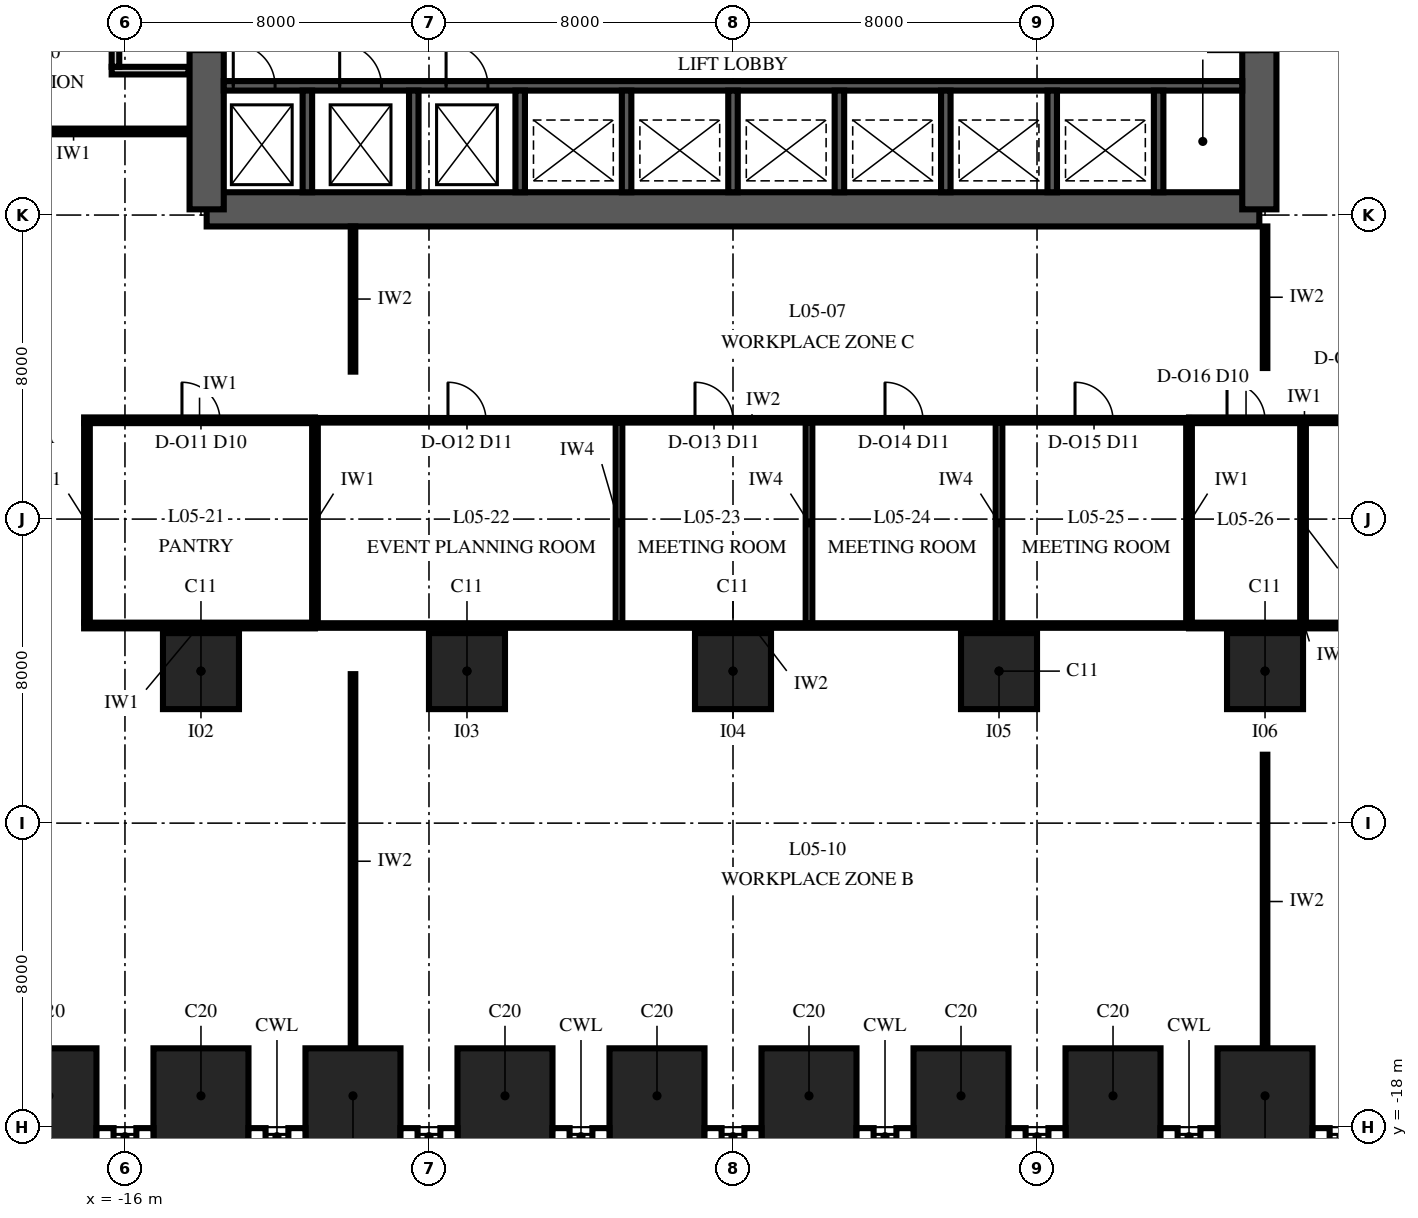
"""IFC4 building model, lengths in metres.
Left out: names, types, materials, properties, quantities, classifications, styles, units other than length and angle.
Written with IfcOpenShell. Run it as: python <this file> out.ifc"""

import sys

from ifc_helpers import new_model, si_unit, direction, frame, frame_2d, origin, origin_2d, place, context, subcontext, project, spatial, polyline, rectangle, outline, extrude, element, fill, save


model = new_model("IFC4")
c1 = context("Model", 3, precision=1e-05, world=origin(), true_north=direction((0.0, 1.0)))
c2 = subcontext(c1, "Body", "Model", "MODEL_VIEW")
j1 = project(units=[si_unit("LENGTHUNIT", "METRE"), si_unit("PLANEANGLEUNIT", "RADIAN")], contexts=[c1])
p1 = place(None, origin())
s1 = spatial("IfcSite", under=j1, at=p1, CompositionType="ELEMENT")
p2 = place(p1, origin())
s2 = spatial("IfcBuilding", under=s1, at=p2, CompositionType="ELEMENT")
p3 = place(p2, frame((0.0, 0.0, 32.0)))
s3 = spatial("IfcBuildingStorey", under=s2, at=p3, CompositionType="ELEMENT", Elevation=32.0)
for number, where, z_axis, x_axis in (
    (1, (-18.0, -17.175, 0.0), (0.0, 0.0, 1.0), (1.0, 0.0, 0.0)),
    (2, (-14.0, -17.175, 0.0), (0.0, 0.0, 1.0), (1.0, 0.0, 0.0)),
    (3, (-10.0, -17.175, 0.0), (0.0, 0.0, 1.0), (1.0, 0.0, 0.0)),
    (4, (-6.0, -17.175, 0.0), (0.0, 0.0, 1.0), (1.0, 0.0, 0.0)),
    (5, (-2.0, -17.175, 0.0), (0.0, 0.0, 1.0), (1.0, 0.0, 0.0)),
    (6, (2.0, -17.175, 0.0), (0.0, 0.0, 1.0), (1.0, 0.0, 0.0)),
    (7, (6.0, -17.175, 0.0), (0.0, 0.0, 1.0), (1.0, 0.0, 0.0)),
    (8, (10.0, -17.175, 0.0), (0.0, 0.0, 1.0), (1.0, 0.0, 0.0)),
    (9, (14.0, -17.175, 0.0), (0.0, 0.0, 1.0), (1.0, 0.0, 0.0)),
):
    element("IfcColumn", number, at=place(p3, frame(where, z_axis=z_axis, x_axis=x_axis)), inside=s3, PredefinedType="COLUMN", context=c2, shape_type="SweptSolid", body=[
        extrude(rectangle(XDim=2.5, YDim=2.5, at=origin_2d()), origin(), (0.0, 0.0, 1.0), 4.0),
    ])
for number, where, z_axis, x_axis in (
    (10, (-14.0, -6.0, 0.0), (0.0, 0.0, 1.0), (1.0, 0.0, 0.0)),
    (11, (-7.0, -6.0, 0.0), (0.0, 0.0, 1.0), (1.0, 0.0, 0.0)),
    (12, (0.0, -6.0, 0.0), (0.0, 0.0, 1.0), (1.0, 0.0, 0.0)),
    (13, (7.0, -6.0, 0.0), (0.0, 0.0, 1.0), (1.0, 0.0, 0.0)),
    (14, (14.0, -6.0, 0.0), (0.0, 0.0, 1.0), (1.0, 0.0, 0.0)),
):
    element("IfcColumn", number, at=place(p3, frame(where, z_axis=z_axis, x_axis=x_axis)), inside=s3, PredefinedType="COLUMN", context=c2, shape_type="SweptSolid", body=[
        extrude(rectangle(XDim=2.0, YDim=2.0, at=origin_2d()), origin(), (0.0, 0.0, 1.0), 4.0),
    ])
p4 = place(p3, frame((-13.85, 6.15, 0.0), z_axis=(0.0, 0.0, 1.0), x_axis=(1.0, 0.0, 0.0)))
e15 = element("IfcWall", 15, at=p4, inside=s3, PredefinedType="SHEAR", context=c2, shape_type="SweptSolid", body=[
    extrude(rectangle(XDim=27.7, YDim=0.9, at=frame_2d((13.85, 0.0))), origin(), (0.0, 0.0, 1.0), 4.0),
])
p5 = place(p3, frame((13.85, 6.15, 0.0), z_axis=(0.0, 0.0, 1.0), x_axis=(0.0, 1.0, 0.0)))
e16 = element("IfcWall", 16, at=p5, inside=s3, PredefinedType="SHEAR", context=c2, shape_type="SweptSolid", body=[
    extrude(outline(polyline([(0.0, -0.45), (17.7, -0.45), (17.7, 0.0), (17.25, 0.0), (17.25, 0.45), (0.45, 0.45), (0.45, 0.0), (0.0, 0.0), (0.0, -0.45)])), origin(), (0.0, 0.0, 1.0), 4.0),
])
p6 = place(p5, frame((4.15, 0.0, 0.0)))
e17 = element("IfcOpeningElement", 17, at=p6, cuts=e16, PredefinedType="OPENING", context=c2, shape_type="SweptSolid", body=[
    extrude(rectangle(XDim=1.8, YDim=2.4, at=frame_2d((0.9, 1.2))), frame((0.0, 0.465, 0.0), z_axis=(0.0, -1.0, 0.0), x_axis=(1.0, 0.0, 0.0)), (0.0, 0.0, 1.0), 0.93),
])
p7 = place(p3, frame((-13.85, 23.85, 0.0), z_axis=(0.0, 0.0, 1.0), x_axis=(0.0, -1.0, 0.0)))
e18 = element("IfcWall", 18, at=p7, inside=s3, PredefinedType="SHEAR", context=c2, shape_type="SweptSolid", body=[
    extrude(outline(polyline([(0.0, -0.45), (17.7, -0.45), (17.7, 0.0), (17.25, 0.0), (17.25, 0.45), (0.45, 0.45), (0.45, 0.0), (0.0, 0.0), (0.0, -0.45)])), origin(), (0.0, 0.0, 1.0), 4.0),
])
p8 = place(p7, frame((11.75, 0.0, 0.0)))
e19 = element("IfcOpeningElement", 19, at=p8, cuts=e18, PredefinedType="OPENING", context=c2, shape_type="SweptSolid", body=[
    extrude(rectangle(XDim=1.8, YDim=2.4, at=frame_2d((0.9, 1.2))), frame((0.0, 0.465, 0.0), z_axis=(0.0, -1.0, 0.0), x_axis=(1.0, 0.0, 0.0)), (0.0, 0.0, 1.0), 0.93),
])
p9 = place(p3, frame((-13.4, 9.4, 0.0), z_axis=(0.0, 0.0, 1.0), x_axis=(1.0, 0.0, 0.0)))
e20 = element("IfcWall", 20, at=p9, inside=s3, PredefinedType="SHEAR", context=c2, shape_type="SweptSolid", body=[
    extrude(rectangle(XDim=26.8, YDim=0.25, at=frame_2d((13.4, 0.0))), origin(), (0.0, 0.0, 1.0), 4.0),
])
p10 = place(p9, frame((0.25, 0.0, 0.0)))
e21 = element("IfcOpeningElement", 21, at=p10, cuts=e20, PredefinedType="OPENING", context=c2, shape_type="SweptSolid", body=[
    extrude(rectangle(XDim=1.1, YDim=2.1, at=frame_2d((0.55, 1.05))), frame((0.0, 0.14, 0.0), z_axis=(0.0, -1.0, 0.0), x_axis=(1.0, 0.0, 0.0)), (0.0, 0.0, 1.0), 0.28),
])
p11 = place(p9, frame((3.05, 0.0, 0.0)))
e22 = element("IfcOpeningElement", 22, at=p11, cuts=e20, PredefinedType="OPENING", context=c2, shape_type="SweptSolid", body=[
    extrude(rectangle(XDim=1.1, YDim=2.1, at=frame_2d((0.55, 1.05))), frame((0.0, 0.14, 0.0), z_axis=(0.0, -1.0, 0.0), x_axis=(1.0, 0.0, 0.0)), (0.0, 0.0, 1.0), 0.28),
])
p12 = place(p9, frame((5.85, 0.0, 0.0)))
e23 = element("IfcOpeningElement", 23, at=p12, cuts=e20, PredefinedType="OPENING", context=c2, shape_type="SweptSolid", body=[
    extrude(rectangle(XDim=1.1, YDim=2.1, at=frame_2d((0.55, 1.05))), frame((0.0, 0.14, 0.0), z_axis=(0.0, -1.0, 0.0), x_axis=(1.0, 0.0, 0.0)), (0.0, 0.0, 1.0), 0.28),
])
for number, where, z_axis, x_axis in (
    (24, (-11.2, 6.6, 0.0), (0.0, 0.0, 1.0), (0.0, 1.0, 0.0)),
    (25, (-8.4, 6.6, 0.0), (0.0, 0.0, 1.0), (0.0, 1.0, 0.0)),
    (26, (-5.6, 6.6, 0.0), (0.0, 0.0, 1.0), (0.0, 1.0, 0.0)),
    (27, (-2.8, 6.6, 0.0), (0.0, 0.0, 1.0), (0.0, 1.0, 0.0)),
    (28, (0.0, 6.6, 0.0), (0.0, 0.0, 1.0), (0.0, 1.0, 0.0)),
    (29, (2.8, 6.6, 0.0), (0.0, 0.0, 1.0), (0.0, 1.0, 0.0)),
    (30, (5.6, 6.6, 0.0), (0.0, 0.0, 1.0), (0.0, 1.0, 0.0)),
    (31, (8.4, 6.6, 0.0), (0.0, 0.0, 1.0), (0.0, 1.0, 0.0)),
    (32, (11.2, 6.6, 0.0), (0.0, 0.0, 1.0), (0.0, 1.0, 0.0)),
):
    element("IfcWall", number, at=place(p3, frame(where, z_axis=z_axis, x_axis=x_axis)), inside=s3, PredefinedType="SHEAR", context=c2, shape_type="SweptSolid", body=[
        extrude(rectangle(XDim=2.675, YDim=0.25, at=frame_2d((1.337, 0.0))), origin(), (0.0, 0.0, 1.0), 4.0),
    ])
p13 = place(p3, frame((-17.075, -4.8, 0.0), z_axis=(0.0, 0.0, 1.0), x_axis=(1.0, 0.0, 0.0)))
e33 = element("IfcWall", 33, at=p13, inside=s3, PredefinedType="PARTITIONING", context=c2, shape_type="SweptSolid", body=[
    extrude(rectangle(XDim=6.075, YDim=0.15, at=frame_2d((3.038, 0.0))), origin(), (0.0, 0.0, 1.0), 3.25),
])
p14 = place(p3, frame((-11.0, -4.8, 0.0), z_axis=(0.0, 0.0, 1.0), x_axis=(1.0, 0.0, 0.0)))
e34 = element("IfcWall", 34, at=p14, inside=s3, PredefinedType="PARTITIONING", context=c2, shape_type="SweptSolid", body=[
    extrude(rectangle(XDim=23.0, YDim=0.12, at=frame_2d((11.5, 0.0))), origin(), (0.0, 0.0, 1.0), 3.25),
])
p15 = place(p3, frame((12.0, -4.8, 0.0), z_axis=(0.0, 0.0, 1.0), x_axis=(1.0, 0.0, 0.0)))
e35 = element("IfcWall", 35, at=p15, inside=s3, PredefinedType="PARTITIONING", context=c2, shape_type="SweptSolid", body=[
    extrude(rectangle(XDim=6.075, YDim=0.15, at=frame_2d((3.038, 0.0))), origin(), (0.0, 0.0, 1.0), 3.25),
])
p16 = place(p3, frame((-17.075, 0.6, 0.0), z_axis=(0.0, 0.0, 1.0), x_axis=(1.0, 0.0, 0.0)))
e36 = element("IfcWall", 36, at=p16, inside=s3, PredefinedType="PARTITIONING", context=c2, shape_type="SweptSolid", body=[
    extrude(rectangle(XDim=6.075, YDim=0.15, at=frame_2d((3.038, 0.0))), origin(), (0.0, 0.0, 1.0), 3.25),
])
p17 = place(p16, frame((2.575, 0.0, 0.0)))
e37 = element("IfcOpeningElement", 37, at=p17, cuts=e36, PredefinedType="OPENING", context=c2, shape_type="SweptSolid", body=[
    extrude(rectangle(XDim=1.0, YDim=2.3, at=frame_2d((0.5, 1.15))), frame((0.0, 0.09, 0.0), z_axis=(0.0, -1.0, 0.0), x_axis=(1.0, 0.0, 0.0)), (0.0, 0.0, 1.0), 0.18),
])
p18 = place(p3, frame((-11.0, 0.6, 0.0), z_axis=(0.0, 0.0, 1.0), x_axis=(1.0, 0.0, 0.0)))
e38 = element("IfcWall", 38, at=p18, inside=s3, PredefinedType="PARTITIONING", context=c2, shape_type="SweptSolid", body=[
    extrude(rectangle(XDim=23.0, YDim=0.12, at=frame_2d((11.5, 0.0))), origin(), (0.0, 0.0, 1.0), 3.25),
])
p19 = place(p18, frame((3.5, 0.0, 0.0)))
e39 = element("IfcOpeningElement", 39, at=p19, cuts=e38, PredefinedType="OPENING", context=c2, shape_type="SweptSolid", body=[
    extrude(rectangle(XDim=1.0, YDim=2.4, at=frame_2d((0.5, 1.2))), frame((0.0, 0.075, 0.0), z_axis=(0.0, -1.0, 0.0), x_axis=(1.0, 0.0, 0.0)), (0.0, 0.0, 1.0), 0.15),
])
p20 = place(p18, frame((10.0, 0.0, 0.0)))
e40 = element("IfcOpeningElement", 40, at=p20, cuts=e38, PredefinedType="OPENING", context=c2, shape_type="SweptSolid", body=[
    extrude(rectangle(XDim=1.0, YDim=2.4, at=frame_2d((0.5, 1.2))), frame((0.0, 0.075, 0.0), z_axis=(0.0, -1.0, 0.0), x_axis=(1.0, 0.0, 0.0)), (0.0, 0.0, 1.0), 0.15),
])
p21 = place(p18, frame((15.0, 0.0, 0.0)))
e41 = element("IfcOpeningElement", 41, at=p21, cuts=e38, PredefinedType="OPENING", context=c2, shape_type="SweptSolid", body=[
    extrude(rectangle(XDim=1.0, YDim=2.4, at=frame_2d((0.5, 1.2))), frame((0.0, 0.075, 0.0), z_axis=(0.0, -1.0, 0.0), x_axis=(1.0, 0.0, 0.0)), (0.0, 0.0, 1.0), 0.15),
])
p22 = place(p18, frame((20.0, 0.0, 0.0)))
e42 = element("IfcOpeningElement", 42, at=p22, cuts=e38, PredefinedType="OPENING", context=c2, shape_type="SweptSolid", body=[
    extrude(rectangle(XDim=1.0, YDim=2.4, at=frame_2d((0.5, 1.2))), frame((0.0, 0.075, 0.0), z_axis=(0.0, -1.0, 0.0), x_axis=(1.0, 0.0, 0.0)), (0.0, 0.0, 1.0), 0.15),
])
p23 = place(p3, frame((12.0, 0.6, 0.0), z_axis=(0.0, 0.0, 1.0), x_axis=(1.0, 0.0, 0.0)))
e43 = element("IfcWall", 43, at=p23, inside=s3, PredefinedType="PARTITIONING", context=c2, shape_type="SweptSolid", body=[
    extrude(rectangle(XDim=6.075, YDim=0.15, at=frame_2d((3.038, 0.0))), origin(), (0.0, 0.0, 1.0), 3.25),
])
p24 = place(p23, frame((1.0, 0.0, 0.0)))
e44 = element("IfcOpeningElement", 44, at=p24, cuts=e43, PredefinedType="OPENING", context=c2, shape_type="SweptSolid", body=[
    extrude(rectangle(XDim=1.0, YDim=2.3, at=frame_2d((0.5, 1.15))), frame((0.0, 0.09, 0.0), z_axis=(0.0, -1.0, 0.0), x_axis=(1.0, 0.0, 0.0)), (0.0, 0.0, 1.0), 0.18),
])
p25 = place(p23, frame((4.0, 0.0, 0.0)))
e45 = element("IfcOpeningElement", 45, at=p25, cuts=e43, PredefinedType="OPENING", context=c2, shape_type="SweptSolid", body=[
    extrude(rectangle(XDim=1.0, YDim=2.3, at=frame_2d((0.5, 1.15))), frame((0.0, 0.09, 0.0), z_axis=(0.0, -1.0, 0.0), x_axis=(1.0, 0.0, 0.0)), (0.0, 0.0, 1.0), 0.18),
])
p26 = place(p3, frame((-20.375, 8.2, 0.0), z_axis=(0.0, 0.0, 1.0), x_axis=(1.0, 0.0, 0.0)))
e46 = element("IfcWall", 46, at=p26, inside=s3, PredefinedType="PARTITIONING", context=c2, shape_type="SweptSolid", body=[
    extrude(rectangle(XDim=6.045, YDim=0.15, at=frame_2d((3.022, 0.0))), origin(), (0.0, 0.0, 1.0), 3.85),
])
p27 = place(p3, frame((-16.35, 9.8, 0.0), z_axis=(0.0, 0.0, 1.0), x_axis=(1.0, 0.0, 0.0)))
e47 = element("IfcWall", 47, at=p27, inside=s3, PredefinedType="PARTITIONING", context=c2, shape_type="SweptSolid", body=[
    extrude(rectangle(XDim=2.02, YDim=0.2, at=frame_2d((1.01, 0.0))), origin(), (0.0, 0.0, 1.0), 3.85),
])
p28 = place(p3, frame((-17.0, -4.725, 0.0), z_axis=(0.0, 0.0, 1.0), x_axis=(0.0, 1.0, 0.0)))
e48 = element("IfcWall", 48, at=p28, inside=s3, PredefinedType="PARTITIONING", context=c2, shape_type="SweptSolid", body=[
    extrude(rectangle(XDim=5.25, YDim=0.15, at=frame_2d((2.625, 0.0))), origin(), (0.0, 0.0, 1.0), 3.85),
])
p29 = place(p3, frame((-16.25, 9.9, 0.0), z_axis=(0.0, 0.0, 1.0), x_axis=(0.0, 1.0, 0.0)))
e49 = element("IfcWall", 49, at=p29, inside=s3, PredefinedType="PARTITIONING", context=c2, shape_type="SweptSolid", body=[
    extrude(rectangle(XDim=16.25, YDim=0.2, at=frame_2d((8.125, 0.0))), origin(), (0.0, 0.0, 1.0), 3.25),
])
p30 = place(p29, frame((14.75, 0.0, 0.0)))
e50 = element("IfcOpeningElement", 50, at=p30, cuts=e49, PredefinedType="OPENING", context=c2, shape_type="SweptSolid", body=[
    extrude(rectangle(XDim=1.2, YDim=2.4, at=frame_2d((0.6, 1.2))), frame((0.0, 0.115, 0.0), z_axis=(0.0, -1.0, 0.0), x_axis=(1.0, 0.0, 0.0)), (0.0, 0.0, 1.0), 0.23),
])
p31 = place(p3, frame((-11.0, -4.725, 0.0), z_axis=(0.0, 0.0, 1.0), x_axis=(0.0, 1.0, 0.0)))
e51 = element("IfcWall", 51, at=p31, inside=s3, PredefinedType="PARTITIONING", context=c2, shape_type="SweptSolid", body=[
    extrude(rectangle(XDim=5.25, YDim=0.15, at=frame_2d((2.625, 0.0))), origin(), (0.0, 0.0, 1.0), 3.85),
])
p32 = place(p3, frame((-3.0, -4.74, 0.0), z_axis=(0.0, 0.0, 1.0), x_axis=(0.0, 1.0, 0.0)))
e52 = element("IfcWall", 52, at=p32, inside=s3, PredefinedType="PARTITIONING", context=c2, shape_type="SweptSolid", body=[
    extrude(rectangle(XDim=5.28, YDim=0.175, at=frame_2d((2.64, 0.0))), origin(), (0.0, 0.0, 1.0), 3.85),
])
p33 = place(p3, frame((2.0, -4.74, 0.0), z_axis=(0.0, 0.0, 1.0), x_axis=(0.0, 1.0, 0.0)))
e53 = element("IfcWall", 53, at=p33, inside=s3, PredefinedType="PARTITIONING", context=c2, shape_type="SweptSolid", body=[
    extrude(rectangle(XDim=5.28, YDim=0.175, at=frame_2d((2.64, 0.0))), origin(), (0.0, 0.0, 1.0), 3.25),
])
p34 = place(p3, frame((7.0, -4.74, 0.0), z_axis=(0.0, 0.0, 1.0), x_axis=(0.0, 1.0, 0.0)))
e54 = element("IfcWall", 54, at=p34, inside=s3, PredefinedType="PARTITIONING", context=c2, shape_type="SweptSolid", body=[
    extrude(rectangle(XDim=5.28, YDim=0.175, at=frame_2d((2.64, 0.0))), origin(), (0.0, 0.0, 1.0), 3.85),
])
for number, where, z_axis, x_axis in (
    (55, (12.0, -4.725, 0.0), (0.0, 0.0, 1.0), (0.0, 1.0, 0.0)),
    (56, (15.0, -4.725, 0.0), (0.0, 0.0, 1.0), (0.0, 1.0, 0.0)),
):
    element("IfcWall", number, at=place(p3, frame(where, z_axis=z_axis, x_axis=x_axis)), inside=s3, PredefinedType="PARTITIONING", context=c2, shape_type="SweptSolid", body=[
        extrude(rectangle(XDim=5.25, YDim=0.15, at=frame_2d((2.625, 0.0))), origin(), (0.0, 0.0, 1.0), 3.85),
    ])
p35 = place(p3, frame((-9.999, -15.925, 0.0), z_axis=(0.0, 0.0, 1.0), x_axis=(0.0, 1.0, 0.0)))
e57 = element("IfcWall", 57, at=p35, inside=s3, PredefinedType="PARTITIONING", context=c2, shape_type="SweptSolid", body=[
    extrude(rectangle(XDim=9.845, YDim=0.12, at=frame_2d((4.922, 0.0))), origin(), (0.0, 0.0, 1.0), 2.842),
])
p36 = place(p3, frame((-9.999, 1.88, 0.0), z_axis=(0.0, 0.0, 1.0), x_axis=(0.0, 1.0, 0.0)))
e58 = element("IfcWall", 58, at=p36, inside=s3, PredefinedType="PARTITIONING", context=c2, shape_type="SweptSolid", body=[
    extrude(rectangle(XDim=3.82, YDim=0.12, at=frame_2d((1.91, 0.0))), origin(), (0.0, 0.0, 1.0), 3.85),
])
p37 = place(p3, frame((14.001, -15.925, 0.0), z_axis=(0.0, 0.0, 1.0), x_axis=(0.0, 1.0, 0.0)))
e59 = element("IfcWall", 59, at=p37, inside=s3, PredefinedType="PARTITIONING", context=c2, shape_type="SweptSolid", body=[
    extrude(rectangle(XDim=7.725, YDim=0.12, at=frame_2d((3.863, 0.0))), origin(), (0.0, 0.0, 1.0), 3.25),
])
p38 = place(p3, frame((14.001, 1.975, 0.0), z_axis=(0.0, 0.0, 1.0), x_axis=(0.0, 1.0, 0.0)))
e60 = element("IfcWall", 60, at=p38, inside=s3, PredefinedType="PARTITIONING", context=c2, shape_type="SweptSolid", body=[
    extrude(rectangle(XDim=3.725, YDim=0.12, at=frame_2d((1.862, 0.0))), origin(), (0.0, 0.0, 1.0), 3.25),
])
p39 = place(p10, origin())
e61 = element("IfcDoor", 61, at=p39, inside=s3, OperationType="SLIDING_TO_LEFT", PredefinedType="DOOR", context=c2, shape_type="SweptSolid", body=[
    extrude(rectangle(XDim=1.1, YDim=2.1, at=frame_2d((0.55, 1.05))), frame((0.0, 0.125, 0.0), z_axis=(0.0, -1.0, 0.0), x_axis=(1.0, 0.0, 0.0)), (0.0, 0.0, 1.0), 0.25),
])
fill(e21, e61)
p40 = place(p11, origin())
e62 = element("IfcDoor", 62, at=p40, inside=s3, OperationType="SLIDING_TO_LEFT", PredefinedType="DOOR", context=c2, shape_type="SweptSolid", body=[
    extrude(rectangle(XDim=1.1, YDim=2.1, at=frame_2d((0.55, 1.05))), frame((0.0, 0.125, 0.0), z_axis=(0.0, -1.0, 0.0), x_axis=(1.0, 0.0, 0.0)), (0.0, 0.0, 1.0), 0.25),
])
fill(e22, e62)
p41 = place(p12, origin())
e63 = element("IfcDoor", 63, at=p41, inside=s3, OperationType="SLIDING_TO_LEFT", PredefinedType="DOOR", context=c2, shape_type="SweptSolid", body=[
    extrude(rectangle(XDim=1.1, YDim=2.1, at=frame_2d((0.55, 1.05))), frame((0.0, 0.125, 0.0), z_axis=(0.0, -1.0, 0.0), x_axis=(1.0, 0.0, 0.0)), (0.0, 0.0, 1.0), 0.25),
])
fill(e23, e63)
p42 = place(p17, origin())
e64 = element("IfcDoor", 64, at=p42, inside=s3, OperationType="SINGLE_SWING_LEFT", PredefinedType="DOOR", context=c2, shape_type="SweptSolid", body=[
    extrude(rectangle(XDim=1.0, YDim=2.3, at=frame_2d((0.5, 1.15))), frame((0.0, 0.075, 0.0), z_axis=(0.0, -1.0, 0.0), x_axis=(1.0, 0.0, 0.0)), (0.0, 0.0, 1.0), 0.149),
])
fill(e37, e64)
p43 = place(p19, origin())
e65 = element("IfcDoor", 65, at=p43, inside=s3, OperationType="SINGLE_SWING_RIGHT", PredefinedType="DOOR", context=c2, shape_type="SweptSolid", body=[
    extrude(rectangle(XDim=1.0, YDim=2.4, at=frame_2d((0.5, 1.2))), frame((0.0, 0.06, 0.0), z_axis=(0.0, -1.0, 0.0), x_axis=(1.0, 0.0, 0.0)), (0.0, 0.0, 1.0), 0.12),
])
fill(e39, e65)
p44 = place(p20, origin())
e66 = element("IfcDoor", 66, at=p44, inside=s3, OperationType="SINGLE_SWING_RIGHT", PredefinedType="DOOR", context=c2, shape_type="SweptSolid", body=[
    extrude(rectangle(XDim=1.0, YDim=2.4, at=frame_2d((0.5, 1.2))), frame((0.0, 0.06, 0.0), z_axis=(0.0, -1.0, 0.0), x_axis=(1.0, 0.0, 0.0)), (0.0, 0.0, 1.0), 0.12),
])
fill(e40, e66)
p45 = place(p21, origin())
e67 = element("IfcDoor", 67, at=p45, inside=s3, OperationType="SINGLE_SWING_RIGHT", PredefinedType="DOOR", context=c2, shape_type="SweptSolid", body=[
    extrude(rectangle(XDim=1.0, YDim=2.4, at=frame_2d((0.5, 1.2))), frame((0.0, 0.06, 0.0), z_axis=(0.0, -1.0, 0.0), x_axis=(1.0, 0.0, 0.0)), (0.0, 0.0, 1.0), 0.12),
])
fill(e41, e67)
p46 = place(p22, origin())
e68 = element("IfcDoor", 68, at=p46, inside=s3, OperationType="SINGLE_SWING_RIGHT", PredefinedType="DOOR", context=c2, shape_type="SweptSolid", body=[
    extrude(rectangle(XDim=1.0, YDim=2.4, at=frame_2d((0.5, 1.2))), frame((0.0, 0.06, 0.0), z_axis=(0.0, -1.0, 0.0), x_axis=(1.0, 0.0, 0.0)), (0.0, 0.0, 1.0), 0.12),
])
fill(e42, e68)
p47 = place(p24, origin())
e69 = element("IfcDoor", 69, at=p47, inside=s3, OperationType="SINGLE_SWING_LEFT", PredefinedType="DOOR", context=c2, shape_type="SweptSolid", body=[
    extrude(rectangle(XDim=1.0, YDim=2.3, at=frame_2d((0.5, 1.15))), frame((0.0, 0.075, 0.0), z_axis=(0.0, -1.0, 0.0), x_axis=(1.0, 0.0, 0.0)), (0.0, 0.0, 1.0), 0.149),
])
fill(e44, e69)
save(model, sys.argv[1])
